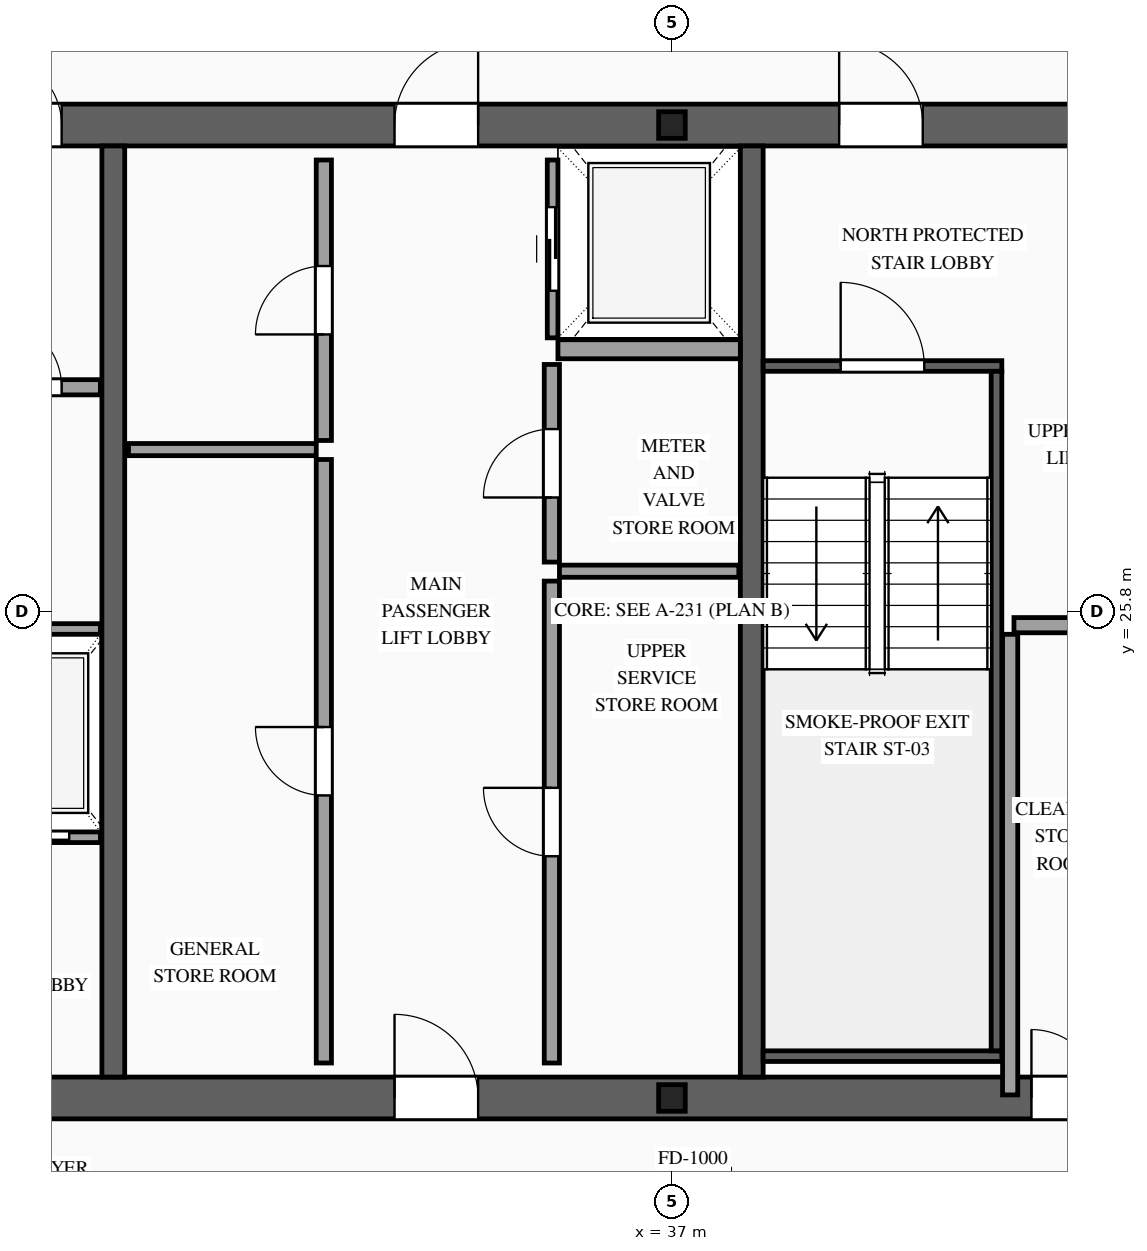
"""IFC4 building model, lengths in metres.
Left out: names, types, materials, properties, quantities, classifications, styles, units other than length and angle.
Written with IfcOpenShell. Run it as: python <this file> out.ifc"""

import sys

from ifc_helpers import new_model, si_unit, direction, frame, frame_2d, origin, origin_2d, place, context, subcontext, project, spatial, rectangle, i_section, extrude, source, transform, mapped, element, fill, save


model = new_model("IFC4")
c1 = context("Model", 3, precision=1e-05, world=origin(), true_north=direction((0.0, 1.0)))
c2 = subcontext(c1, "Body", "Model", "MODEL_VIEW")
j1 = project(units=[si_unit("LENGTHUNIT", "METRE"), si_unit("PLANEANGLEUNIT", "RADIAN")], contexts=[c1])
p1 = place(None, origin())
s1 = spatial("IfcSite", under=j1, at=p1, CompositionType="ELEMENT")
p2 = place(p1, origin())
s2 = spatial("IfcBuilding", under=s1, at=p2, CompositionType="ELEMENT")
p3 = place(p2, frame((0.0, 0.0, 275.1)))
s3 = spatial("IfcBuildingStorey", under=s2, at=p3, CompositionType="ELEMENT", Elevation=275.1)
p4 = place(p3, frame((23.525, 19.4, 0.0), z_axis=(0.0, 0.0, 1.0), x_axis=(1.0, 0.0, 0.0)))
e1 = element("IfcWall", 1, at=p4, inside=s3, PredefinedType="SHEAR", context=c2, shape_type="SweptSolid", body=[
    extrude(rectangle(XDim=26.95, YDim=0.55, at=frame_2d((13.475, 0.0))), origin(), (0.0, 0.0, 1.0), 3.5),
])
p5 = place(p4, frame((1.925, 0.0, 0.0)))
e2 = element("IfcOpeningElement", 2, at=p5, cuts=e1, PredefinedType="OPENING", context=c2, shape_type="SweptSolid", body=[
    extrude(rectangle(XDim=1.1, YDim=2.2, at=frame_2d((0.55, 1.1))), frame((0.0, 0.29, 0.0), z_axis=(0.0, -1.0, 0.0), x_axis=(1.0, 0.0, 0.0)), (0.0, 0.0, 1.0), 0.58),
])
p6 = place(p4, frame((9.825, 0.0, 0.0)))
e3 = element("IfcOpeningElement", 3, at=p6, cuts=e1, PredefinedType="OPENING", context=c2, shape_type="SweptSolid", body=[
    extrude(rectangle(XDim=1.1, YDim=2.2, at=frame_2d((0.55, 1.1))), frame((0.0, 0.29, 0.0), z_axis=(0.0, -1.0, 0.0), x_axis=(1.0, 0.0, 0.0)), (0.0, 0.0, 1.0), 0.58),
])
p7 = place(p4, frame((23.025, 0.0, 0.0)))
e4 = element("IfcOpeningElement", 4, at=p7, cuts=e1, PredefinedType="OPENING", context=c2, shape_type="SweptSolid", body=[
    extrude(rectangle(XDim=1.1, YDim=2.2, at=frame_2d((0.55, 1.1))), frame((0.0, 0.29, 0.0), z_axis=(0.0, -1.0, 0.0), x_axis=(1.0, 0.0, 0.0)), (0.0, 0.0, 1.0), 0.58),
])
p8 = place(p4, frame((19.645, 0.0, 0.0)))
e5 = element("IfcOpeningElement", 5, at=p8, cuts=e1, PredefinedType="OPENING", context=c2, shape_type="SweptSolid", body=[
    extrude(rectangle(XDim=0.9, YDim=2.15, at=frame_2d((0.45, 1.075))), frame((0.0, 0.29, 0.0), z_axis=(0.0, -1.0, 0.0), x_axis=(1.0, 0.0, 0.0)), (0.0, 0.0, 1.0), 0.58),
])
p9 = place(p4, frame((18.205, 0.0, 0.0)))
e6 = element("IfcOpeningElement", 6, at=p9, cuts=e1, PredefinedType="OPENING", context=c2, shape_type="SweptSolid", body=[
    extrude(rectangle(XDim=0.9, YDim=2.15, at=frame_2d((0.45, 1.075))), frame((0.0, 0.29, 0.0), z_axis=(0.0, -1.0, 0.0), x_axis=(1.0, 0.0, 0.0)), (0.0, 0.0, 1.0), 0.58),
])
p10 = place(p3, frame((23.525, 32.2, 0.0), z_axis=(0.0, 0.0, 1.0), x_axis=(1.0, 0.0, 0.0)))
e7 = element("IfcWall", 7, at=p10, inside=s3, PredefinedType="SHEAR", context=c2, shape_type="SweptSolid", body=[
    extrude(rectangle(XDim=26.95, YDim=0.55, at=frame_2d((13.475, 0.0))), origin(), (0.0, 0.0, 1.0), 3.5),
])
p11 = place(p10, frame((4.545, 0.0, 0.0)))
e8 = element("IfcOpeningElement", 8, at=p11, cuts=e7, PredefinedType="OPENING", context=c2, shape_type="SweptSolid", body=[
    extrude(rectangle(XDim=0.9, YDim=2.15, at=frame_2d((0.45, 1.075))), frame((0.0, 0.29, 0.0), z_axis=(0.0, -1.0, 0.0), x_axis=(1.0, 0.0, 0.0)), (0.0, 0.0, 1.0), 0.58),
])
p12 = place(p10, frame((9.825, 0.0, 0.0)))
e9 = element("IfcOpeningElement", 9, at=p12, cuts=e7, PredefinedType="OPENING", context=c2, shape_type="SweptSolid", body=[
    extrude(rectangle(XDim=1.1, YDim=2.2, at=frame_2d((0.55, 1.1))), frame((0.0, 0.29, 0.0), z_axis=(0.0, -1.0, 0.0), x_axis=(1.0, 0.0, 0.0)), (0.0, 0.0, 1.0), 0.58),
])
p13 = place(p10, frame((15.675, 0.0, 0.0)))
e10 = element("IfcOpeningElement", 10, at=p13, cuts=e7, PredefinedType="OPENING", context=c2, shape_type="SweptSolid", body=[
    extrude(rectangle(XDim=1.1, YDim=2.2, at=frame_2d((0.55, 1.1))), frame((0.0, 0.29, 0.0), z_axis=(0.0, -1.0, 0.0), x_axis=(1.0, 0.0, 0.0)), (0.0, 0.0, 1.0), 0.58),
])
p14 = place(p10, frame((18.775, 0.0, 0.0)))
e11 = element("IfcOpeningElement", 11, at=p14, cuts=e7, PredefinedType="OPENING", context=c2, shape_type="SweptSolid", body=[
    extrude(rectangle(XDim=1.1, YDim=2.2, at=frame_2d((0.55, 1.1))), frame((0.0, 0.29, 0.0), z_axis=(0.0, -1.0, 0.0), x_axis=(1.0, 0.0, 0.0)), (0.0, 0.0, 1.0), 0.58),
])
m1 = source(origin(), c2, "Body", "SweptSolid", [
    extrude(rectangle(XDim=12.25, YDim=0.3, at=frame_2d((6.125, 0.0))), origin(), (0.0, 0.0, 1.0), 3.5),
])
for number, where, z_axis, x_axis in (
    (12, (29.65, 19.675, 0.0), (0.0, 0.0, 1.0), (0.0, 1.0, 0.0)),
    (13, (38.05, 19.675, 0.0), (0.0, 0.0, 1.0), (0.0, 1.0, 0.0)),
):
    element("IfcWall", number, at=place(p3, frame(where, z_axis=z_axis, x_axis=x_axis)), inside=s3, PredefinedType="SOLIDWALL", context=c2, shape_type="MappedRepresentation", body=[
        mapped(m1, transform((0.0, 0.0, 0.0), scale=1.0)),
    ])
m2 = source(origin(), c2, "Body", "SweptSolid", [
    extrude(i_section(OverallWidth=0.35, OverallDepth=0.35, WebThickness=0.012, FlangeThickness=0.019, at=origin_2d()), origin(), (0.0, 0.0, 1.0), 3.5),
])
for number, where, z_axis, x_axis in (
    (14, (37.0, 19.4, 0.0), (0.0, 0.0, 1.0), (1.0, 0.0, 0.0)),
    (15, (37.0, 32.2, 0.0), (0.0, 0.0, 1.0), (1.0, 0.0, 0.0)),
):
    element("IfcColumn", number, at=place(p3, frame(where, z_axis=z_axis, x_axis=x_axis)), inside=s3, PredefinedType="COLUMN", context=c2, shape_type="MappedRepresentation", body=[
        mapped(m2, transform((0.0, 0.0, 0.0), scale=1.0)),
    ])
p15 = place(p3, frame((27.56, 22.83, 0.0), z_axis=(0.0, 0.0, 1.0), x_axis=(1.0, 0.0, 0.0)))
e16 = element("IfcWall", 16, at=p15, inside=s3, PredefinedType="SOLIDWALL", context=c2, shape_type="SweptSolid", body=[
    extrude(rectangle(XDim=1.92, YDim=0.14, at=frame_2d((0.96, 0.0))), origin(), (0.0, 0.0, 1.0), 3.28),
])
p16 = place(p15, frame((0.41, 0.0, 0.0)))
e17 = element("IfcOpeningElement", 17, at=p16, cuts=e16, PredefinedType="OPENING", context=c2, shape_type="SweptSolid", body=[
    extrude(rectangle(XDim=1.1, YDim=2.2, at=frame_2d((0.55, 1.1))), frame((0.0, 0.085, 0.0), z_axis=(0.0, -1.0, 0.0), x_axis=(1.0, 0.0, 0.0)), (0.0, 0.0, 1.0), 0.17),
])
m3 = source(origin(), c2, "Body", "SweptSolid", [
    extrude(rectangle(XDim=1.92, YDim=0.14, at=frame_2d((0.96, 0.0))), origin(), (0.0, 0.0, 1.0), 3.28),
])
p17 = place(p3, frame((27.56, 25.57, 0.0), z_axis=(0.0, 0.0, 1.0), x_axis=(1.0, 0.0, 0.0)))
e18 = element("IfcWall", 18, at=p17, inside=s3, PredefinedType="SOLIDWALL", context=c2, shape_type="MappedRepresentation", body=[
    mapped(m3, transform((0.0, 0.0, 0.0), scale=1.0)),
])
p18 = place(p3, frame((35.43, 29.4, 0.0), z_axis=(0.0, 0.0, 1.0), x_axis=(0.0, 1.0, 0.0)))
e19 = element("IfcWall", 19, at=p18, inside=s3, PredefinedType="SOLIDWALL", context=c2, shape_type="SweptSolid", body=[
    extrude(rectangle(XDim=2.34, YDim=0.14, at=frame_2d((1.17, 0.0))), origin(), (0.0, 0.0, 1.0), 3.28),
])
p19 = place(p18, frame((0.62, 0.0, 0.0)))
e20 = element("IfcOpeningElement", 20, at=p19, cuts=e19, PredefinedType="OPENING", context=c2, shape_type="SweptSolid", body=[
    extrude(rectangle(XDim=1.1, YDim=2.2, at=frame_2d((0.55, 1.1))), frame((0.0, 0.085, 0.0), z_axis=(0.0, -1.0, 0.0), x_axis=(1.0, 0.0, 0.0)), (0.0, 0.0, 1.0), 0.17),
])
m4 = source(origin(), c2, "Body", "SweptSolid", [
    extrude(rectangle(XDim=2.4, YDim=0.25, at=frame_2d((1.2, 0.0))), origin(), (0.0, 0.0, 1.0), 3.28),
])
p20 = place(p3, frame((35.5, 29.25, 0.0), z_axis=(0.0, 0.0, 1.0), x_axis=(1.0, 0.0, 0.0)))
e21 = element("IfcWall", 21, at=p20, inside=s3, PredefinedType="SOLIDWALL", context=c2, shape_type="MappedRepresentation", body=[
    mapped(m4, transform((0.0, 0.0, 0.0), scale=1.0)),
])
p21 = place(p3, frame((38.2, 29.03, 0.0), z_axis=(0.0, 0.0, 1.0), x_axis=(1.0, 0.0, 0.0)))
e22 = element("IfcWall", 22, at=p21, inside=s3, PredefinedType="SOLIDWALL", context=c2, shape_type="SweptSolid", body=[
    extrude(rectangle(XDim=3.14, YDim=0.14, at=frame_2d((1.57, 0.0))), origin(), (0.0, 0.0, 1.0), 3.28),
])
p22 = place(p21, frame((1.02, 0.0, 0.0)))
e23 = element("IfcOpeningElement", 23, at=p22, cuts=e22, PredefinedType="OPENING", context=c2, shape_type="SweptSolid", body=[
    extrude(rectangle(XDim=1.1, YDim=2.2, at=frame_2d((0.55, 1.1))), frame((0.0, 0.085, 0.0), z_axis=(0.0, -1.0, 0.0), x_axis=(1.0, 0.0, 0.0)), (0.0, 0.0, 1.0), 0.17),
])
m5 = source(origin(), c2, "Body", "SweptSolid", [
    extrude(rectangle(XDim=3.14, YDim=0.14, at=frame_2d((1.57, 0.0))), origin(), (0.0, 0.0, 1.0), 3.28),
])
p23 = place(p3, frame((38.2, 19.95, 0.0), z_axis=(0.0, 0.0, 1.0), x_axis=(1.0, 0.0, 0.0)))
e24 = element("IfcWall", 24, at=p23, inside=s3, PredefinedType="SOLIDWALL", context=c2, shape_type="MappedRepresentation", body=[
    mapped(m5, transform((0.0, 0.0, 0.0), scale=1.0)),
])
m6 = source(origin(), c2, "Body", "SweptSolid", [
    extrude(rectangle(XDim=8.94, YDim=0.14, at=frame_2d((4.47, 0.0))), origin(), (0.0, 0.0, 1.0), 3.28),
])
p24 = place(p3, frame((41.27, 20.02, 0.0), z_axis=(0.0, 0.0, 1.0), x_axis=(0.0, 1.0, 0.0)))
e25 = element("IfcWall", 25, at=p24, inside=s3, PredefinedType="SOLIDWALL", context=c2, shape_type="MappedRepresentation", body=[
    mapped(m6, transform((0.0, 0.0, 0.0), scale=1.0)),
])
p25 = place(p3, frame((27.56, 28.75, 0.0), z_axis=(0.0, 0.0, 1.0), x_axis=(1.0, 0.0, 0.0)))
e26 = element("IfcWall", 26, at=p25, inside=s3, PredefinedType="PARTITIONING", context=c2, shape_type="SweptSolid", body=[
    extrude(rectangle(XDim=1.92, YDim=0.2, at=frame_2d((0.96, 0.0))), origin(), (0.0, 0.0, 1.0), 3.28),
])
p26 = place(p25, frame((0.51, 0.0, 0.0)))
e27 = element("IfcOpeningElement", 27, at=p26, cuts=e26, PredefinedType="OPENING", context=c2, shape_type="SweptSolid", body=[
    extrude(rectangle(XDim=0.9, YDim=2.15, at=frame_2d((0.45, 1.075))), frame((0.0, 0.115, 0.0), z_axis=(0.0, -1.0, 0.0), x_axis=(1.0, 0.0, 0.0)), (0.0, 0.0, 1.0), 0.23),
])
p27 = place(p3, frame((32.42, 19.86, 0.0), z_axis=(0.0, 0.0, 1.0), x_axis=(0.0, 1.0, 0.0)))
e28 = element("IfcWall", 28, at=p27, inside=s3, PredefinedType="PARTITIONING", context=c2, shape_type="SweptSolid", body=[
    extrude(rectangle(XDim=7.94, YDim=0.2, at=frame_2d((3.97, 0.0))), origin(), (0.0, 0.0, 1.0), 3.28),
])
p28 = place(p27, frame((3.52, 0.0, 0.0)))
e29 = element("IfcOpeningElement", 29, at=p28, cuts=e28, PredefinedType="OPENING", context=c2, shape_type="SweptSolid", body=[
    extrude(rectangle(XDim=0.9, YDim=2.15, at=frame_2d((0.45, 1.075))), frame((0.0, 0.115, 0.0), z_axis=(0.0, -1.0, 0.0), x_axis=(1.0, 0.0, 0.0)), (0.0, 0.0, 1.0), 0.23),
])
p29 = place(p3, frame((32.42, 28.05, 0.0), z_axis=(0.0, 0.0, 1.0), x_axis=(0.0, 1.0, 0.0)))
e30 = element("IfcWall", 30, at=p29, inside=s3, PredefinedType="PARTITIONING", context=c2, shape_type="SweptSolid", body=[
    extrude(rectangle(XDim=3.69, YDim=0.2, at=frame_2d((1.845, 0.0))), origin(), (0.0, 0.0, 1.0), 3.28),
])
p30 = place(p29, frame((1.395, 0.0, 0.0)))
e31 = element("IfcOpeningElement", 31, at=p30, cuts=e30, PredefinedType="OPENING", context=c2, shape_type="SweptSolid", body=[
    extrude(rectangle(XDim=0.9, YDim=2.15, at=frame_2d((0.45, 1.075))), frame((0.0, 0.115, 0.0), z_axis=(0.0, -1.0, 0.0), x_axis=(1.0, 0.0, 0.0)), (0.0, 0.0, 1.0), 0.23),
])
m7 = source(origin(), c2, "Body", "SweptSolid", [
    extrude(rectangle(XDim=2.47, YDim=0.16, at=frame_2d((1.235, 0.0))), origin(), (0.0, 0.0, 1.0), 3.28),
])
p31 = place(p3, frame((29.85, 27.93, 0.0), z_axis=(0.0, 0.0, 1.0), x_axis=(1.0, 0.0, 0.0)))
e32 = element("IfcWall", 32, at=p31, inside=s3, PredefinedType="PARTITIONING", context=c2, shape_type="MappedRepresentation", body=[
    mapped(m7, transform((0.0, 0.0, 0.0), scale=1.0)),
])
p32 = place(p3, frame((35.42, 19.86, 0.0), z_axis=(0.0, 0.0, 1.0), x_axis=(0.0, 1.0, 0.0)))
e33 = element("IfcWall", 33, at=p32, inside=s3, PredefinedType="PARTITIONING", context=c2, shape_type="SweptSolid", body=[
    extrude(rectangle(XDim=6.34, YDim=0.2, at=frame_2d((3.17, 0.0))), origin(), (0.0, 0.0, 1.0), 3.28),
])
p33 = place(p32, frame((2.72, 0.0, 0.0)))
e34 = element("IfcOpeningElement", 34, at=p33, cuts=e33, PredefinedType="OPENING", context=c2, shape_type="SweptSolid", body=[
    extrude(rectangle(XDim=0.9, YDim=2.15, at=frame_2d((0.45, 1.075))), frame((0.0, 0.115, 0.0), z_axis=(0.0, -1.0, 0.0), x_axis=(1.0, 0.0, 0.0)), (0.0, 0.0, 1.0), 0.23),
])
p34 = place(p3, frame((35.42, 26.45, 0.0), z_axis=(0.0, 0.0, 1.0), x_axis=(0.0, 1.0, 0.0)))
e35 = element("IfcWall", 35, at=p34, inside=s3, PredefinedType="PARTITIONING", context=c2, shape_type="SweptSolid", body=[
    extrude(rectangle(XDim=2.6, YDim=0.2, at=frame_2d((1.3, 0.0))), origin(), (0.0, 0.0, 1.0), 3.28),
])
p35 = place(p34, frame((0.85, 0.0, 0.0)))
e36 = element("IfcOpeningElement", 36, at=p35, cuts=e35, PredefinedType="OPENING", context=c2, shape_type="SweptSolid", body=[
    extrude(rectangle(XDim=0.9, YDim=2.15, at=frame_2d((0.45, 1.075))), frame((0.0, 0.115, 0.0), z_axis=(0.0, -1.0, 0.0), x_axis=(1.0, 0.0, 0.0)), (0.0, 0.0, 1.0), 0.23),
])
m8 = source(origin(), c2, "Body", "SweptSolid", [
    extrude(rectangle(XDim=2.36, YDim=0.16, at=frame_2d((1.18, 0.0))), origin(), (0.0, 0.0, 1.0), 3.28),
])
p36 = place(p3, frame((35.52, 26.33, 0.0), z_axis=(0.0, 0.0, 1.0), x_axis=(1.0, 0.0, 0.0)))
e37 = element("IfcWall", 37, at=p36, inside=s3, PredefinedType="PARTITIONING", context=c2, shape_type="MappedRepresentation", body=[
    mapped(m8, transform((0.0, 0.0, 0.0), scale=1.0)),
])
m9 = source(origin(), c2, "Body", "SweptSolid", [
    extrude(rectangle(XDim=6.06, YDim=0.2, at=frame_2d((3.03, 0.0))), origin(), (0.0, 0.0, 1.0), 3.28),
])
p37 = place(p3, frame((41.45, 19.44, 0.0), z_axis=(0.0, 0.0, 1.0), x_axis=(0.0, 1.0, 0.0)))
e38 = element("IfcWall", 38, at=p37, inside=s3, PredefinedType="PARTITIONING", context=c2, shape_type="MappedRepresentation", body=[
    mapped(m9, transform((0.0, 0.0, 0.0), scale=1.0)),
])
m10 = source(origin(), c2, "Body", "SweptSolid", [
    extrude(rectangle(XDim=1.35, YDim=0.2, at=frame_2d((0.675, 0.0))), origin(), (0.0, 0.0, 1.0), 3.28),
])
p38 = place(p3, frame((41.5, 25.62, 0.0), z_axis=(0.0, 0.0, 1.0), x_axis=(1.0, 0.0, 0.0)))
e39 = element("IfcWall", 39, at=p38, inside=s3, PredefinedType="PARTITIONING", context=c2, shape_type="MappedRepresentation", body=[
    mapped(m10, transform((0.0, 0.0, 0.0), scale=1.0)),
])
m11 = source(origin(), c2, "Body", "SweptSolid", [
    extrude(rectangle(XDim=1.1, YDim=2.2, at=frame_2d((0.55, 1.1))), frame((0.0, 0.025, 0.0), z_axis=(0.0, -1.0, 0.0), x_axis=(1.0, 0.0, 0.0)), (0.0, 0.0, 1.0), 0.05),
])
p39 = place(p16, origin())
e40 = element("IfcDoor", 40, at=p39, inside=s3, OperationType="SLIDING_TO_LEFT", PredefinedType="DOOR", context=c2, shape_type="MappedRepresentation", body=[
    mapped(m11, transform((0.0, 0.0, 0.0), scale=1.0)),
])
fill(e17, e40)
p40 = place(p19, origin())
e41 = element("IfcDoor", 41, at=p40, inside=s3, OperationType="SLIDING_TO_RIGHT", PredefinedType="DOOR", context=c2, shape_type="MappedRepresentation", body=[
    mapped(m11, transform((0.0, 0.0, 0.0), scale=1.0)),
])
fill(e20, e41)
m12 = source(origin(), c2, "Body", "SweptSolid", [
    extrude(rectangle(XDim=1.1, YDim=2.2, at=frame_2d((0.55, 1.1))), frame((0.0, 0.025, 0.0), z_axis=(0.0, -1.0, 0.0), x_axis=(1.0, 0.0, 0.0)), (0.0, 0.0, 1.0), 0.05),
])
p41 = place(p22, origin())
e42 = element("IfcDoor", 42, at=p41, inside=s3, OperationType="SINGLE_SWING_LEFT", PredefinedType="DOOR", context=c2, shape_type="MappedRepresentation", body=[
    mapped(m12, transform((0.0, 0.0, 0.0), scale=1.0)),
])
fill(e23, e42)
p42 = place(p6, origin())
e43 = element("IfcDoor", 43, at=p42, inside=s3, OperationType="SINGLE_SWING_LEFT", PredefinedType="DOOR", context=c2, shape_type="MappedRepresentation", body=[
    mapped(m12, transform((0.0, 0.0, 0.0), scale=1.0)),
])
fill(e3, e43)
m13 = source(origin(), c2, "Body", "SweptSolid", [
    extrude(rectangle(XDim=0.9, YDim=2.15, at=frame_2d((0.45, 1.075))), frame((0.0, 0.025, 0.0), z_axis=(0.0, -1.0, 0.0), x_axis=(1.0, 0.0, 0.0)), (0.0, 0.0, 1.0), 0.05),
])
p43 = place(p11, origin())
e44 = element("IfcDoor", 44, at=p43, inside=s3, OperationType="SINGLE_SWING_LEFT", PredefinedType="DOOR", context=c2, shape_type="MappedRepresentation", body=[
    mapped(m13, transform((0.0, 0.0, 0.0), scale=1.0)),
])
fill(e8, e44)
p44 = place(p12, origin())
e45 = element("IfcDoor", 45, at=p44, inside=s3, OperationType="SINGLE_SWING_RIGHT", PredefinedType="DOOR", context=c2, shape_type="MappedRepresentation", body=[
    mapped(m12, transform((0.0, 0.0, 0.0), scale=1.0)),
])
fill(e9, e45)
p45 = place(p13, origin())
e46 = element("IfcDoor", 46, at=p45, inside=s3, OperationType="SINGLE_SWING_LEFT", PredefinedType="DOOR", context=c2, shape_type="MappedRepresentation", body=[
    mapped(m12, transform((0.0, 0.0, 0.0), scale=1.0)),
])
fill(e10, e46)
p46 = place(p26, origin())
e47 = element("IfcDoor", 47, at=p46, inside=s3, OperationType="SINGLE_SWING_LEFT", PredefinedType="DOOR", context=c2, shape_type="MappedRepresentation", body=[
    mapped(m13, transform((0.0, 0.0, 0.0), scale=1.0)),
])
fill(e27, e47)
p47 = place(p28, origin())
e48 = element("IfcDoor", 48, at=p47, inside=s3, OperationType="SINGLE_SWING_RIGHT", PredefinedType="DOOR", context=c2, shape_type="MappedRepresentation", body=[
    mapped(m13, transform((0.0, 0.0, 0.0), scale=1.0)),
])
fill(e29, e48)
p48 = place(p30, origin())
e49 = element("IfcDoor", 49, at=p48, inside=s3, OperationType="SINGLE_SWING_LEFT", PredefinedType="DOOR", context=c2, shape_type="MappedRepresentation", body=[
    mapped(m13, transform((0.0, 0.0, 0.0), scale=1.0)),
])
fill(e31, e49)
p49 = place(p33, origin())
e50 = element("IfcDoor", 50, at=p49, inside=s3, OperationType="SINGLE_SWING_RIGHT", PredefinedType="DOOR", context=c2, shape_type="MappedRepresentation", body=[
    mapped(m13, transform((0.0, 0.0, 0.0), scale=1.0)),
])
fill(e34, e50)
p50 = place(p35, origin())
e51 = element("IfcDoor", 51, at=p50, inside=s3, OperationType="SINGLE_SWING_LEFT", PredefinedType="DOOR", context=c2, shape_type="MappedRepresentation", body=[
    mapped(m13, transform((0.0, 0.0, 0.0), scale=1.0)),
])
fill(e36, e51)
p51 = place(p9, origin())
e52 = element("IfcDoor", 52, at=p51, inside=s3, OperationType="SINGLE_SWING_LEFT", PredefinedType="DOOR", context=c2, shape_type="MappedRepresentation", body=[
    mapped(m13, transform((0.0, 0.0, 0.0), scale=1.0)),
])
fill(e6, e52)
save(model, sys.argv[1])
